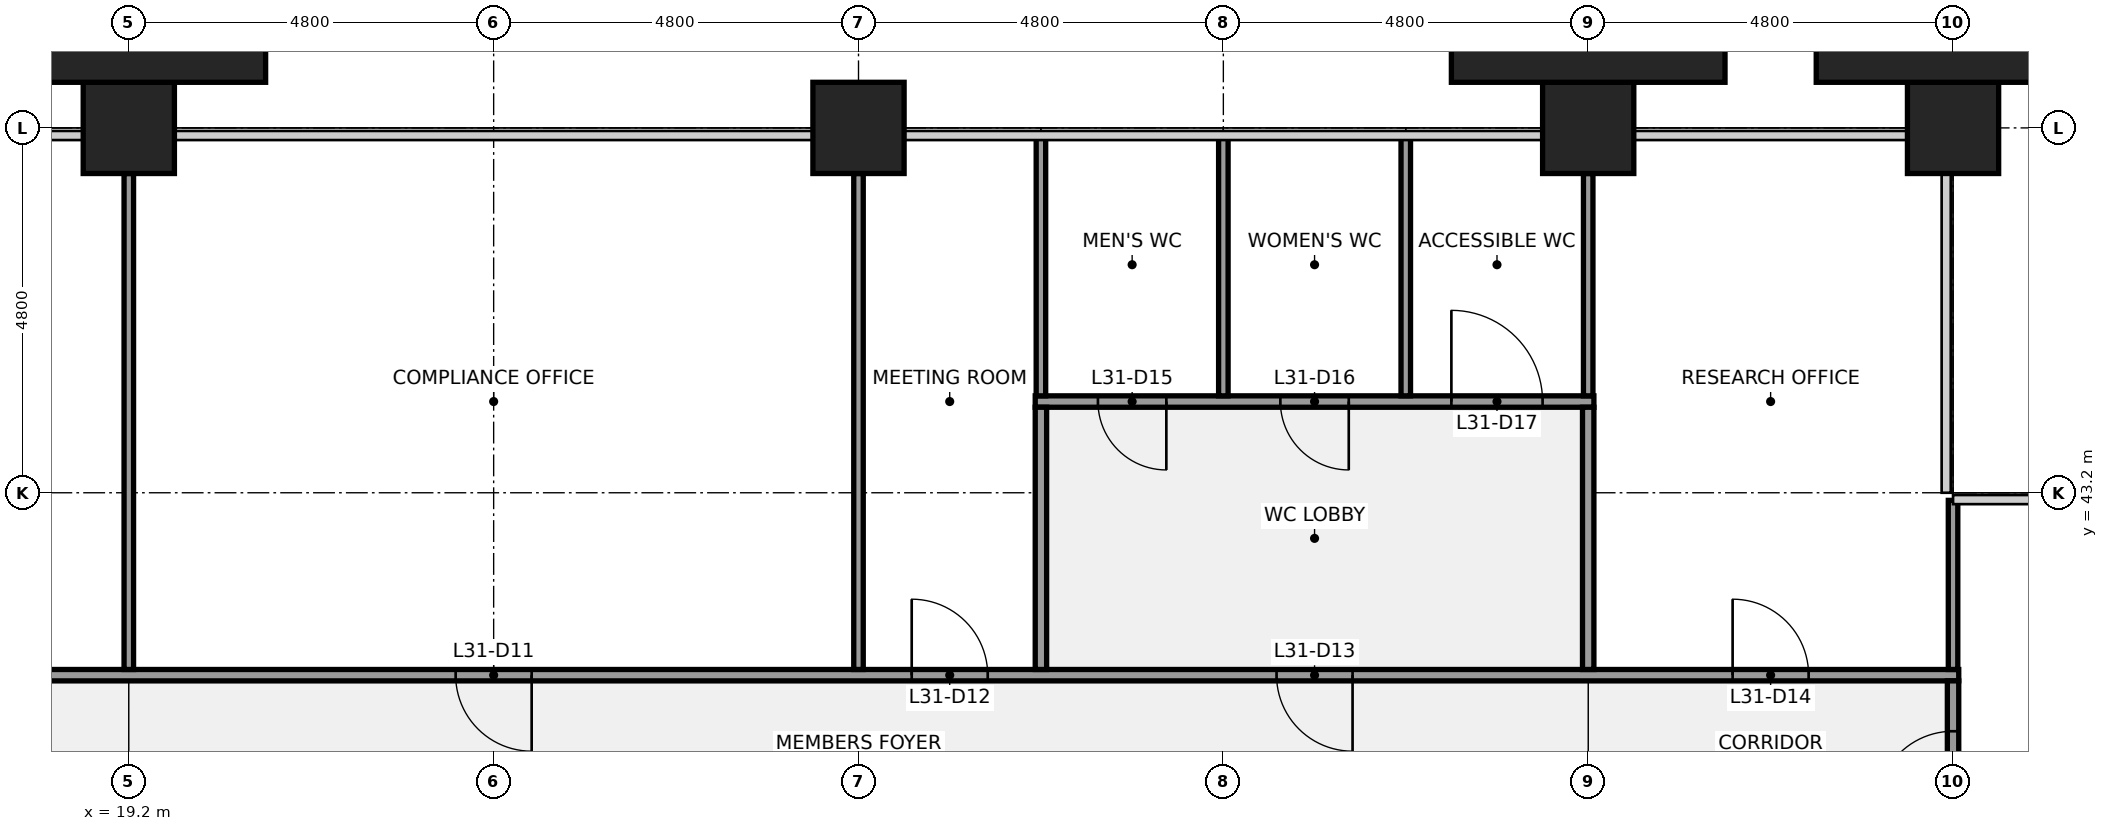
"""IFC4 building model, lengths in metres.
Left out: names, types, materials, properties, quantities, classifications, styles, units other than length and angle.
Written with IfcOpenShell. Run it as: python <this file> out.ifc"""

import sys

from ifc_helpers import new_model, si_unit, direction, frame, frame_2d, origin, origin_2d, place, context, subcontext, project, spatial, rectangle, extrude, element, fill, save


model = new_model("IFC4")
c1 = context("Model", 3, precision=1e-05, world=origin(), true_north=direction((0.0, 1.0)))
c2 = subcontext(c1, "Body", "Model", "MODEL_VIEW")
j1 = project(units=[si_unit("LENGTHUNIT", "METRE"), si_unit("PLANEANGLEUNIT", "RADIAN")], contexts=[c1])
p1 = place(None, origin())
s1 = spatial("IfcSite", under=j1, at=p1, CompositionType="ELEMENT")
p2 = place(p1, origin())
s2 = spatial("IfcBuilding", under=s1, at=p2, CompositionType="ELEMENT")
p3 = place(p2, frame((0.0, 0.0, 144.1)))
s3 = spatial("IfcBuildingStorey", under=s2, at=p3, CompositionType="ELEMENT", Elevation=144.1)
for number, where, z_axis, x_axis in (
    (1, (19.2, 48.0, 0.0), (0.0, 0.0, 1.0), (1.0, 0.0, 0.0)),
    (2, (28.8, 48.0, 0.0), (0.0, 0.0, 1.0), (1.0, 0.0, 0.0)),
    (3, (38.4, 48.0, 0.0), (0.0, 0.0, 1.0), (1.0, 0.0, 0.0)),
    (4, (43.2, 48.0, 0.0), (0.0, 0.0, 1.0), (1.0, 0.0, 0.0)),
):
    element("IfcColumn", number, at=place(p3, frame(where, z_axis=z_axis, x_axis=x_axis)), inside=s3, PredefinedType="COLUMN", context=c2, shape_type="SweptSolid", body=[
        extrude(rectangle(XDim=1.2, YDim=1.2, at=origin_2d()), origin(), (0.0, 0.0, 1.0), 4.0),
    ])
p4 = place(p3, frame((14.325, 40.8, 0.0), z_axis=(0.0, 0.0, 1.0), x_axis=(1.0, 0.0, 0.0)))
e5 = element("IfcWall", 5, at=p4, inside=s3, PredefinedType="PARTITIONING", context=c2, shape_type="SweptSolid", body=[
    extrude(rectangle(XDim=28.95, YDim=0.15, at=frame_2d((14.475, 0.0))), origin(), (0.0, 0.0, 1.0), 2.936),
])
p5 = place(p4, frame((1.975, 0.0, 0.0)))
e6 = element("IfcOpeningElement", 6, at=p5, cuts=e5, PredefinedType="OPENING", context=c2, shape_type="SweptSolid", body=[
    extrude(rectangle(XDim=1.0, YDim=2.1, at=frame_2d((0.5, 1.05))), frame((0.0, 0.085, 0.0), z_axis=(0.0, -1.0, 0.0), x_axis=(1.0, 0.0, 0.0)), (0.0, 0.0, 1.0), 0.17),
])
p6 = place(p4, frame((9.175, 0.0, 0.0)))
e7 = element("IfcOpeningElement", 7, at=p6, cuts=e5, PredefinedType="OPENING", context=c2, shape_type="SweptSolid", body=[
    extrude(rectangle(XDim=1.0, YDim=2.1, at=frame_2d((0.5, 1.05))), frame((0.0, 0.085, 0.0), z_axis=(0.0, -1.0, 0.0), x_axis=(1.0, 0.0, 0.0)), (0.0, 0.0, 1.0), 0.17),
])
p7 = place(p4, frame((15.175, 0.0, 0.0)))
e8 = element("IfcOpeningElement", 8, at=p7, cuts=e5, PredefinedType="OPENING", context=c2, shape_type="SweptSolid", body=[
    extrude(rectangle(XDim=1.0, YDim=2.1, at=frame_2d((0.5, 1.05))), frame((0.0, 0.085, 0.0), z_axis=(0.0, -1.0, 0.0), x_axis=(1.0, 0.0, 0.0)), (0.0, 0.0, 1.0), 0.17),
])
p8 = place(p4, frame((19.975, 0.0, 0.0)))
e9 = element("IfcOpeningElement", 9, at=p8, cuts=e5, PredefinedType="OPENING", context=c2, shape_type="SweptSolid", body=[
    extrude(rectangle(XDim=1.0, YDim=2.1, at=frame_2d((0.5, 1.05))), frame((0.0, 0.085, 0.0), z_axis=(0.0, -1.0, 0.0), x_axis=(1.0, 0.0, 0.0)), (0.0, 0.0, 1.0), 0.17),
])
p9 = place(p4, frame((25.975, 0.0, 0.0)))
e10 = element("IfcOpeningElement", 10, at=p9, cuts=e5, PredefinedType="OPENING", context=c2, shape_type="SweptSolid", body=[
    extrude(rectangle(XDim=1.0, YDim=2.1, at=frame_2d((0.5, 1.05))), frame((0.0, 0.085, 0.0), z_axis=(0.0, -1.0, 0.0), x_axis=(1.0, 0.0, 0.0)), (0.0, 0.0, 1.0), 0.17),
])
p10 = place(p3, frame((31.125, 44.4, 0.0), z_axis=(0.0, 0.0, 1.0), x_axis=(1.0, 0.0, 0.0)))
e11 = element("IfcWall", 11, at=p10, inside=s3, PredefinedType="PARTITIONING", context=c2, shape_type="SweptSolid", body=[
    extrude(rectangle(XDim=7.35, YDim=0.15, at=frame_2d((3.675, 0.0))), origin(), (0.0, 0.0, 1.0), 2.936),
])
p11 = place(p10, frame((0.825, 0.0, 0.0)))
e12 = element("IfcOpeningElement", 12, at=p11, cuts=e11, PredefinedType="OPENING", context=c2, shape_type="SweptSolid", body=[
    extrude(rectangle(XDim=0.9, YDim=2.1, at=frame_2d((0.45, 1.05))), frame((0.0, 0.085, 0.0), z_axis=(0.0, -1.0, 0.0), x_axis=(1.0, 0.0, 0.0)), (0.0, 0.0, 1.0), 0.17),
])
p12 = place(p10, frame((3.225, 0.0, 0.0)))
e13 = element("IfcOpeningElement", 13, at=p12, cuts=e11, PredefinedType="OPENING", context=c2, shape_type="SweptSolid", body=[
    extrude(rectangle(XDim=0.9, YDim=2.1, at=frame_2d((0.45, 1.05))), frame((0.0, 0.085, 0.0), z_axis=(0.0, -1.0, 0.0), x_axis=(1.0, 0.0, 0.0)), (0.0, 0.0, 1.0), 0.17),
])
p13 = place(p10, frame((5.475, 0.0, 0.0)))
e14 = element("IfcOpeningElement", 14, at=p13, cuts=e11, PredefinedType="OPENING", context=c2, shape_type="SweptSolid", body=[
    extrude(rectangle(XDim=1.2, YDim=2.1, at=frame_2d((0.6, 1.05))), frame((0.0, 0.085, 0.0), z_axis=(0.0, -1.0, 0.0), x_axis=(1.0, 0.0, 0.0)), (0.0, 0.0, 1.0), 0.17),
])
for number, where, z_axis, x_axis in (
    (15, (19.2, 40.875, 0.0), (0.0, 0.0, 1.0), (0.0, 1.0, 0.0)),
    (16, (28.8, 40.875, 0.0), (0.0, 0.0, 1.0), (0.0, 1.0, 0.0)),
):
    element("IfcWall", number, at=place(p3, frame(where, z_axis=z_axis, x_axis=x_axis)), inside=s3, PredefinedType="PARTITIONING", context=c2, shape_type="SweptSolid", body=[
        extrude(rectangle(XDim=6.525, YDim=0.125, at=frame_2d((3.262, 0.0))), origin(), (0.0, 0.0, 1.0), 2.936),
    ])
p14 = place(p3, frame((31.2, 44.475, 0.0), z_axis=(0.0, 0.0, 1.0), x_axis=(0.0, 1.0, 0.0)))
e17 = element("IfcWall", 17, at=p14, inside=s3, PredefinedType="PARTITIONING", context=c2, shape_type="SweptSolid", body=[
    extrude(rectangle(XDim=3.425, YDim=0.125, at=frame_2d((1.712, 0.0))), origin(), (0.0, 0.0, 1.0), 2.936),
])
p15 = place(p3, frame((31.2, 40.875, 0.0), z_axis=(0.0, 0.0, 1.0), x_axis=(0.0, 1.0, 0.0)))
e18 = element("IfcWall", 18, at=p15, inside=s3, PredefinedType="PARTITIONING", context=c2, shape_type="SweptSolid", body=[
    extrude(rectangle(XDim=3.45, YDim=0.15, at=frame_2d((1.725, 0.0))), origin(), (0.0, 0.0, 1.0), 2.936),
])
for number, where, z_axis, x_axis in (
    (19, (33.6, 44.475, 0.0), (0.0, 0.0, 1.0), (0.0, 1.0, 0.0)),
    (20, (36.0, 44.475, 0.0), (0.0, 0.0, 1.0), (0.0, 1.0, 0.0)),
):
    element("IfcWall", number, at=place(p3, frame(where, z_axis=z_axis, x_axis=x_axis)), inside=s3, PredefinedType="PARTITIONING", context=c2, shape_type="SweptSolid", body=[
        extrude(rectangle(XDim=3.425, YDim=0.125, at=frame_2d((1.712, 0.0))), origin(), (0.0, 0.0, 1.0), 2.936),
    ])
p16 = place(p3, frame((38.4, 44.475, 0.0), z_axis=(0.0, 0.0, 1.0), x_axis=(0.0, 1.0, 0.0)))
e21 = element("IfcWall", 21, at=p16, inside=s3, PredefinedType="PARTITIONING", context=c2, shape_type="SweptSolid", body=[
    extrude(rectangle(XDim=2.925, YDim=0.125, at=frame_2d((1.462, 0.0))), origin(), (0.0, 0.0, 1.0), 2.936),
])
p17 = place(p3, frame((38.4, 40.875, 0.0), z_axis=(0.0, 0.0, 1.0), x_axis=(0.0, 1.0, 0.0)))
e22 = element("IfcWall", 22, at=p17, inside=s3, PredefinedType="PARTITIONING", context=c2, shape_type="SweptSolid", body=[
    extrude(rectangle(XDim=3.45, YDim=0.15, at=frame_2d((1.725, 0.0))), origin(), (0.0, 0.0, 1.0), 2.936),
])
p18 = place(p3, frame((43.2, 40.875, 0.0), z_axis=(0.0, 0.0, 1.0), x_axis=(0.0, 1.0, 0.0)))
e23 = element("IfcWall", 23, at=p18, inside=s3, PredefinedType="PARTITIONING", context=c2, shape_type="SweptSolid", body=[
    extrude(rectangle(XDim=2.225, YDim=0.125, at=frame_2d((1.113, 0.0))), origin(), (0.0, 0.0, 1.0), 2.936),
])
p19 = place(p3, frame((43.2, 38.4, 0.0), z_axis=(0.0, 0.0, 1.0), x_axis=(0.0, 1.0, 0.0)))
e24 = element("IfcWall", 24, at=p19, inside=s3, PredefinedType="PARTITIONING", context=c2, shape_type="SweptSolid", body=[
    extrude(rectangle(XDim=2.325, YDim=0.15, at=frame_2d((1.163, 0.0))), origin(), (0.0, 0.0, 1.0), 2.936),
])
p20 = place(p19, frame((0.663, 0.0, 0.0)))
e25 = element("IfcOpeningElement", 25, at=p20, cuts=e24, PredefinedType="OPENING", context=c2, shape_type="SweptSolid", body=[
    extrude(rectangle(XDim=1.0, YDim=2.1, at=frame_2d((0.5, 1.05))), frame((0.0, 0.085, 0.0), z_axis=(0.0, -1.0, 0.0), x_axis=(1.0, 0.0, 0.0)), (0.0, 0.0, 1.0), 0.17),
])
for number, where, z_axis, x_axis in (
    (26, (19.2, 49.05, 0.0), (0.0, 0.0, 1.0), (1.0, 0.0, 0.0)),
    (27, (38.4, 49.05, 0.0), (0.0, 0.0, 1.0), (1.0, 0.0, 0.0)),
    (28, (43.2, 49.05, 0.0), (0.0, 0.0, 1.0), (1.0, 0.0, 0.0)),
):
    element("IfcColumn", number, at=place(p3, frame(where, z_axis=z_axis, x_axis=x_axis)), inside=s3, PredefinedType="PILASTER", context=c2, shape_type="SweptSolid", body=[
        extrude(rectangle(XDim=3.6, YDim=0.9, at=origin_2d()), origin(), (0.0, 0.0, 1.0), 4.0),
    ])
p21 = place(p6, origin())
e29 = element("IfcDoor", 29, at=p21, inside=s3, OperationType="SINGLE_SWING_RIGHT", PredefinedType="DOOR", context=c2, shape_type="SweptSolid", body=[
    extrude(rectangle(XDim=1.0, YDim=2.1, at=frame_2d((0.5, 1.05))), frame((0.0, 0.025, 0.0), z_axis=(0.0, -1.0, 0.0), x_axis=(1.0, 0.0, 0.0)), (0.0, 0.0, 1.0), 0.05),
])
fill(e7, e29)
p22 = place(p7, origin())
e30 = element("IfcDoor", 30, at=p22, inside=s3, OperationType="SINGLE_SWING_LEFT", PredefinedType="DOOR", context=c2, shape_type="SweptSolid", body=[
    extrude(rectangle(XDim=1.0, YDim=2.1, at=frame_2d((0.5, 1.05))), frame((0.0, 0.025, 0.0), z_axis=(0.0, -1.0, 0.0), x_axis=(1.0, 0.0, 0.0)), (0.0, 0.0, 1.0), 0.05),
])
fill(e8, e30)
p23 = place(p8, origin())
e31 = element("IfcDoor", 31, at=p23, inside=s3, OperationType="SINGLE_SWING_RIGHT", PredefinedType="DOOR", context=c2, shape_type="SweptSolid", body=[
    extrude(rectangle(XDim=1.0, YDim=2.1, at=frame_2d((0.5, 1.05))), frame((0.0, 0.025, 0.0), z_axis=(0.0, -1.0, 0.0), x_axis=(1.0, 0.0, 0.0)), (0.0, 0.0, 1.0), 0.05),
])
fill(e9, e31)
p24 = place(p9, origin())
e32 = element("IfcDoor", 32, at=p24, inside=s3, OperationType="SINGLE_SWING_LEFT", PredefinedType="DOOR", context=c2, shape_type="SweptSolid", body=[
    extrude(rectangle(XDim=1.0, YDim=2.1, at=frame_2d((0.5, 1.05))), frame((0.0, 0.025, 0.0), z_axis=(0.0, -1.0, 0.0), x_axis=(1.0, 0.0, 0.0)), (0.0, 0.0, 1.0), 0.05),
])
fill(e10, e32)
p25 = place(p11, origin())
e33 = element("IfcDoor", 33, at=p25, inside=s3, OperationType="SINGLE_SWING_RIGHT", PredefinedType="DOOR", context=c2, shape_type="SweptSolid", body=[
    extrude(rectangle(XDim=0.9, YDim=2.1, at=frame_2d((0.45, 1.05))), frame((0.0, 0.025, 0.0), z_axis=(0.0, -1.0, 0.0), x_axis=(1.0, 0.0, 0.0)), (0.0, 0.0, 1.0), 0.05),
])
fill(e12, e33)
p26 = place(p12, origin())
e34 = element("IfcDoor", 34, at=p26, inside=s3, OperationType="SINGLE_SWING_RIGHT", PredefinedType="DOOR", context=c2, shape_type="SweptSolid", body=[
    extrude(rectangle(XDim=0.9, YDim=2.1, at=frame_2d((0.45, 1.05))), frame((0.0, 0.025, 0.0), z_axis=(0.0, -1.0, 0.0), x_axis=(1.0, 0.0, 0.0)), (0.0, 0.0, 1.0), 0.05),
])
fill(e13, e34)
p27 = place(p13, origin())
e35 = element("IfcDoor", 35, at=p27, inside=s3, OperationType="SINGLE_SWING_LEFT", PredefinedType="DOOR", context=c2, shape_type="SweptSolid", body=[
    extrude(rectangle(XDim=1.2, YDim=2.1, at=frame_2d((0.6, 1.05))), frame((0.0, 0.025, 0.0), z_axis=(0.0, -1.0, 0.0), x_axis=(1.0, 0.0, 0.0)), (0.0, 0.0, 1.0), 0.05),
])
fill(e14, e35)
p28 = place(p20, origin())
e36 = element("IfcDoor", 36, at=p28, inside=s3, OperationType="SINGLE_SWING_LEFT", PredefinedType="DOOR", context=c2, shape_type="SweptSolid", body=[
    extrude(rectangle(XDim=1.0, YDim=2.1, at=frame_2d((0.5, 1.05))), frame((0.0, 0.025, 0.0), z_axis=(0.0, -1.0, 0.0), x_axis=(1.0, 0.0, 0.0)), (0.0, 0.0, 1.0), 0.05),
])
fill(e25, e36)
save(model, sys.argv[1])
